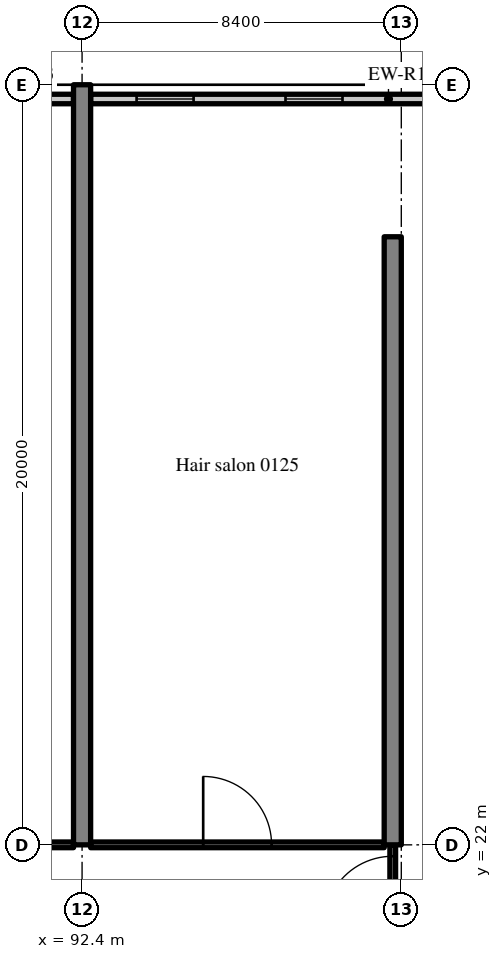
"""IFC4 building model, lengths in metres.
Left out: names, types, materials, properties, quantities, classifications, styles, units other than length and angle.
Written with IfcOpenShell. Run it as: python <this file> out.ifc"""

import sys

from ifc_helpers import new_model, si_unit, direction, frame, frame_2d, origin, place, context, subcontext, project, spatial, rectangle, extrude, source, transform, mapped, element, fill, save


model = new_model("IFC4")
c1 = context("Model", 3, precision=1e-05, world=origin(), true_north=direction((0.0, 1.0)))
c2 = subcontext(c1, "Body", "Model", "MODEL_VIEW")
j1 = project(units=[si_unit("LENGTHUNIT", "METRE"), si_unit("PLANEANGLEUNIT", "RADIAN")], contexts=[c1])
p1 = place(None, origin())
s1 = spatial("IfcSite", under=j1, at=p1, CompositionType="ELEMENT")
p2 = place(p1, origin())
s2 = spatial("IfcBuilding", under=s1, at=p2, CompositionType="ELEMENT")
p3 = place(p2, frame((0.0, 0.0, 6.0)))
s3 = spatial("IfcBuildingStorey", under=s2, at=p3, CompositionType="ELEMENT", Elevation=6.0)
m1 = source(origin(), c2, "Body", "SweptSolid", [
    extrude(rectangle(XDim=20.0, YDim=0.45, at=frame_2d((10.0, 0.0))), origin(), (0.0, 0.0, 1.0), 5.12),
])
p4 = place(p3, frame((92.4, 22.0, 0.0), z_axis=(0.0, 0.0, 1.0), x_axis=(0.0, 1.0, 0.0)))
e1 = element("IfcWall", 1, at=p4, inside=s3, PredefinedType="SHEAR", context=c2, shape_type="MappedRepresentation", body=[
    mapped(m1, transform((0.0, 0.0, 0.0), scale=1.0)),
])
m2 = source(origin(), c2, "Body", "SweptSolid", [
    extrude(rectangle(XDim=16.0, YDim=0.45, at=frame_2d((8.0, 0.0))), origin(), (0.0, 0.0, 1.0), 5.12),
])
p5 = place(p3, frame((100.575, 22.0, 0.0), z_axis=(0.0, 0.0, 1.0), x_axis=(0.0, 1.0, 0.0)))
e2 = element("IfcWall", 2, at=p5, inside=s3, PredefinedType="SHEAR", context=c2, shape_type="MappedRepresentation", body=[
    mapped(m2, transform((0.0, 0.0, 0.0), scale=1.0)),
])
m3 = source(origin(), c2, "Body", "SweptSolid", [
    extrude(rectangle(XDim=15.675, YDim=0.25, at=frame_2d((7.837, 0.0))), origin(), (0.0, 0.0, 1.0), 4.37),
])
p6 = place(p3, frame((108.3, 41.625, 0.0), z_axis=(0.0, 0.0, 1.0), x_axis=(-1.0, 0.0, 0.0)))
e3 = element("IfcWall", 3, at=p6, inside=s3, PredefinedType="SOLIDWALL", context=c2, shape_type="MappedRepresentation", body=[
    mapped(m3, transform((0.0, 0.0, 0.0), scale=1.0)),
])
m4 = source(origin(), c2, "Body", "SweptSolid", [
    extrude(rectangle(XDim=1.5, YDim=1.5, at=frame_2d((0.75, 0.75))), frame((0.0, 0.135, 0.0), z_axis=(0.0, -1.0, 0.0), x_axis=(1.0, 0.0, 0.0)), (0.0, 0.0, 1.0), 0.27),
])
p7 = place(p6, frame((1.209, 0.0, 0.9)))
e4 = element("IfcOpeningElement", 4, at=p7, cuts=e3, PredefinedType="OPENING", context=c2, shape_type="MappedRepresentation", body=[
    mapped(m4, transform((0.0, 0.0, 0.0), scale=1.0)),
])
p8 = place(p6, frame((5.128, 0.0, 0.9)))
e5 = element("IfcOpeningElement", 5, at=p8, cuts=e3, PredefinedType="OPENING", context=c2, shape_type="MappedRepresentation", body=[
    mapped(m4, transform((0.0, 0.0, 0.0), scale=1.0)),
])
p9 = place(p6, frame((9.047, 0.0, 0.9)))
e6 = element("IfcOpeningElement", 6, at=p9, cuts=e3, PredefinedType="OPENING", context=c2, shape_type="MappedRepresentation", body=[
    mapped(m4, transform((0.0, 0.0, 0.0), scale=1.0)),
])
p10 = place(p6, frame((12.966, 0.0, 0.9)))
e7 = element("IfcOpeningElement", 7, at=p10, cuts=e3, PredefinedType="OPENING", context=c2, shape_type="MappedRepresentation", body=[
    mapped(m4, transform((0.0, 0.0, 0.0), scale=1.0)),
])
m5 = source(origin(), c2, "Body", "SweptSolid", [
    extrude(rectangle(XDim=3.525, YDim=0.25, at=frame_2d((1.763, 0.0))), origin(), (0.0, 0.0, 1.0), 4.37),
])
p11 = place(p3, frame((92.175, 41.625, 0.0), z_axis=(0.0, 0.0, 1.0), x_axis=(-1.0, 0.0, 0.0)))
e8 = element("IfcWall", 8, at=p11, inside=s3, PredefinedType="SOLIDWALL", context=c2, shape_type="MappedRepresentation", body=[
    mapped(m5, transform((0.0, 0.0, 0.0), scale=1.0)),
])
p12 = place(p11, frame((1.012, 0.0, 0.9)))
e9 = element("IfcOpeningElement", 9, at=p12, cuts=e8, PredefinedType="OPENING", context=c2, shape_type="MappedRepresentation", body=[
    mapped(m4, transform((0.0, 0.0, 0.0), scale=1.0)),
])
m6 = source(origin(), c2, "Body", "SweptSolid", [
    extrude(rectangle(XDim=2.4, YDim=0.15, at=frame_2d((1.2, 0.0))), origin(), (0.0, 0.0, 1.0), 4.22),
])
p13 = place(p3, frame((100.575, 19.6, 0.0), z_axis=(0.0, 0.0, 1.0), x_axis=(0.0, 1.0, 0.0)))
e10 = element("IfcWall", 10, at=p13, inside=s3, PredefinedType="PARTITIONING", context=c2, shape_type="MappedRepresentation", body=[
    mapped(m6, transform((0.0, 0.0, 0.0), scale=1.0)),
])
m7 = source(origin(), c2, "Body", "SweptSolid", [
    extrude(rectangle(XDim=1.8, YDim=2.1, at=frame_2d((0.9, 1.05))), frame((0.0, 0.085, 0.0), z_axis=(0.0, -1.0, 0.0), x_axis=(1.0, 0.0, 0.0)), (0.0, 0.0, 1.0), 0.17),
])
p14 = place(p13, frame((0.3, 0.0, 0.0)))
e11 = element("IfcOpeningElement", 11, at=p14, cuts=e10, PredefinedType="OPENING", context=c2, shape_type="MappedRepresentation", body=[
    mapped(m7, transform((0.0, 0.0, 0.0), scale=1.0)),
])
m8 = source(origin(), c2, "Body", "SweptSolid", [
    extrude(rectangle(XDim=3.9, YDim=0.15, at=frame_2d((1.95, 0.0))), origin(), (0.0, 0.0, 1.0), 4.42),
])
p15 = place(p3, frame((88.275, 22.0, 0.0), z_axis=(0.0, 0.0, 1.0), x_axis=(1.0, 0.0, 0.0)))
e12 = element("IfcWall", 12, at=p15, inside=s3, PredefinedType="PARTITIONING", context=c2, shape_type="MappedRepresentation", body=[
    mapped(m8, transform((0.0, 0.0, 0.0), scale=1.0)),
])
m9 = source(origin(), c2, "Body", "SweptSolid", [
    extrude(rectangle(XDim=1.0, YDim=2.1, at=frame_2d((0.5, 1.05))), frame((0.0, 0.085, 0.0), z_axis=(0.0, -1.0, 0.0), x_axis=(1.0, 0.0, 0.0)), (0.0, 0.0, 1.0), 0.17),
])
p16 = place(p15, frame((1.45, 0.0, 0.0)))
e13 = element("IfcOpeningElement", 13, at=p16, cuts=e12, PredefinedType="OPENING", context=c2, shape_type="MappedRepresentation", body=[
    mapped(m9, transform((0.0, 0.0, 0.0), scale=1.0)),
])
m10 = source(origin(), c2, "Body", "SweptSolid", [
    extrude(rectangle(XDim=7.725, YDim=0.15, at=frame_2d((3.863, 0.0))), origin(), (0.0, 0.0, 1.0), 4.42),
])
p17 = place(p3, frame((92.625, 22.0, 0.0), z_axis=(0.0, 0.0, 1.0), x_axis=(1.0, 0.0, 0.0)))
e14 = element("IfcWall", 14, at=p17, inside=s3, PredefinedType="PARTITIONING", context=c2, shape_type="MappedRepresentation", body=[
    mapped(m10, transform((0.0, 0.0, 0.0), scale=1.0)),
])
p18 = place(p17, frame((2.962, 0.0, 0.0)))
e15 = element("IfcOpeningElement", 15, at=p18, cuts=e14, PredefinedType="OPENING", context=c2, shape_type="MappedRepresentation", body=[
    mapped(m7, transform((0.0, 0.0, 0.0), scale=1.0)),
])
m11 = source(origin(), c2, "Body", "SweptSolid", [
    extrude(rectangle(XDim=1.5, YDim=1.5, at=frame_2d((0.75, 0.75))), frame((0.0, 0.03, 0.0), z_axis=(0.0, -1.0, 0.0), x_axis=(1.0, 0.0, 0.0)), (0.0, 0.0, 1.0), 0.06),
])
p19 = place(p9, origin())
e16 = element("IfcWindow", 16, at=p19, inside=s3, PartitioningType="SINGLE_PANEL", PredefinedType="WINDOW", context=c2, shape_type="MappedRepresentation", body=[
    mapped(m11, transform((0.0, 0.0, 0.0), scale=1.0)),
])
fill(e6, e16)
p20 = place(p10, origin())
e17 = element("IfcWindow", 17, at=p20, inside=s3, PartitioningType="SINGLE_PANEL", PredefinedType="WINDOW", context=c2, shape_type="MappedRepresentation", body=[
    mapped(m11, transform((0.0, 0.0, 0.0), scale=1.0)),
])
fill(e7, e17)
m12 = source(origin(), c2, "Body", "SweptSolid", [
    extrude(rectangle(XDim=1.8, YDim=2.1, at=frame_2d((0.9, 1.05))), frame((0.0, 0.025, 0.0), z_axis=(0.0, -1.0, 0.0), x_axis=(1.0, 0.0, 0.0)), (0.0, 0.0, 1.0), 0.05),
])
p21 = place(p14, origin())
e18 = element("IfcDoor", 18, at=p21, inside=s3, OperationType="DOUBLE_DOOR_SINGLE_SWING", PredefinedType="DOOR", context=c2, shape_type="MappedRepresentation", body=[
    mapped(m12, transform((0.0, 0.0, 0.0), scale=1.0)),
])
fill(e11, e18)
p22 = place(p18, origin())
e19 = element("IfcDoor", 19, at=p22, inside=s3, OperationType="DOUBLE_DOOR_SINGLE_SWING", PredefinedType="DOOR", context=c2, shape_type="MappedRepresentation", body=[
    mapped(m12, transform((0.0, 0.0, 0.0), scale=1.0)),
])
fill(e15, e19)
save(model, sys.argv[1])
